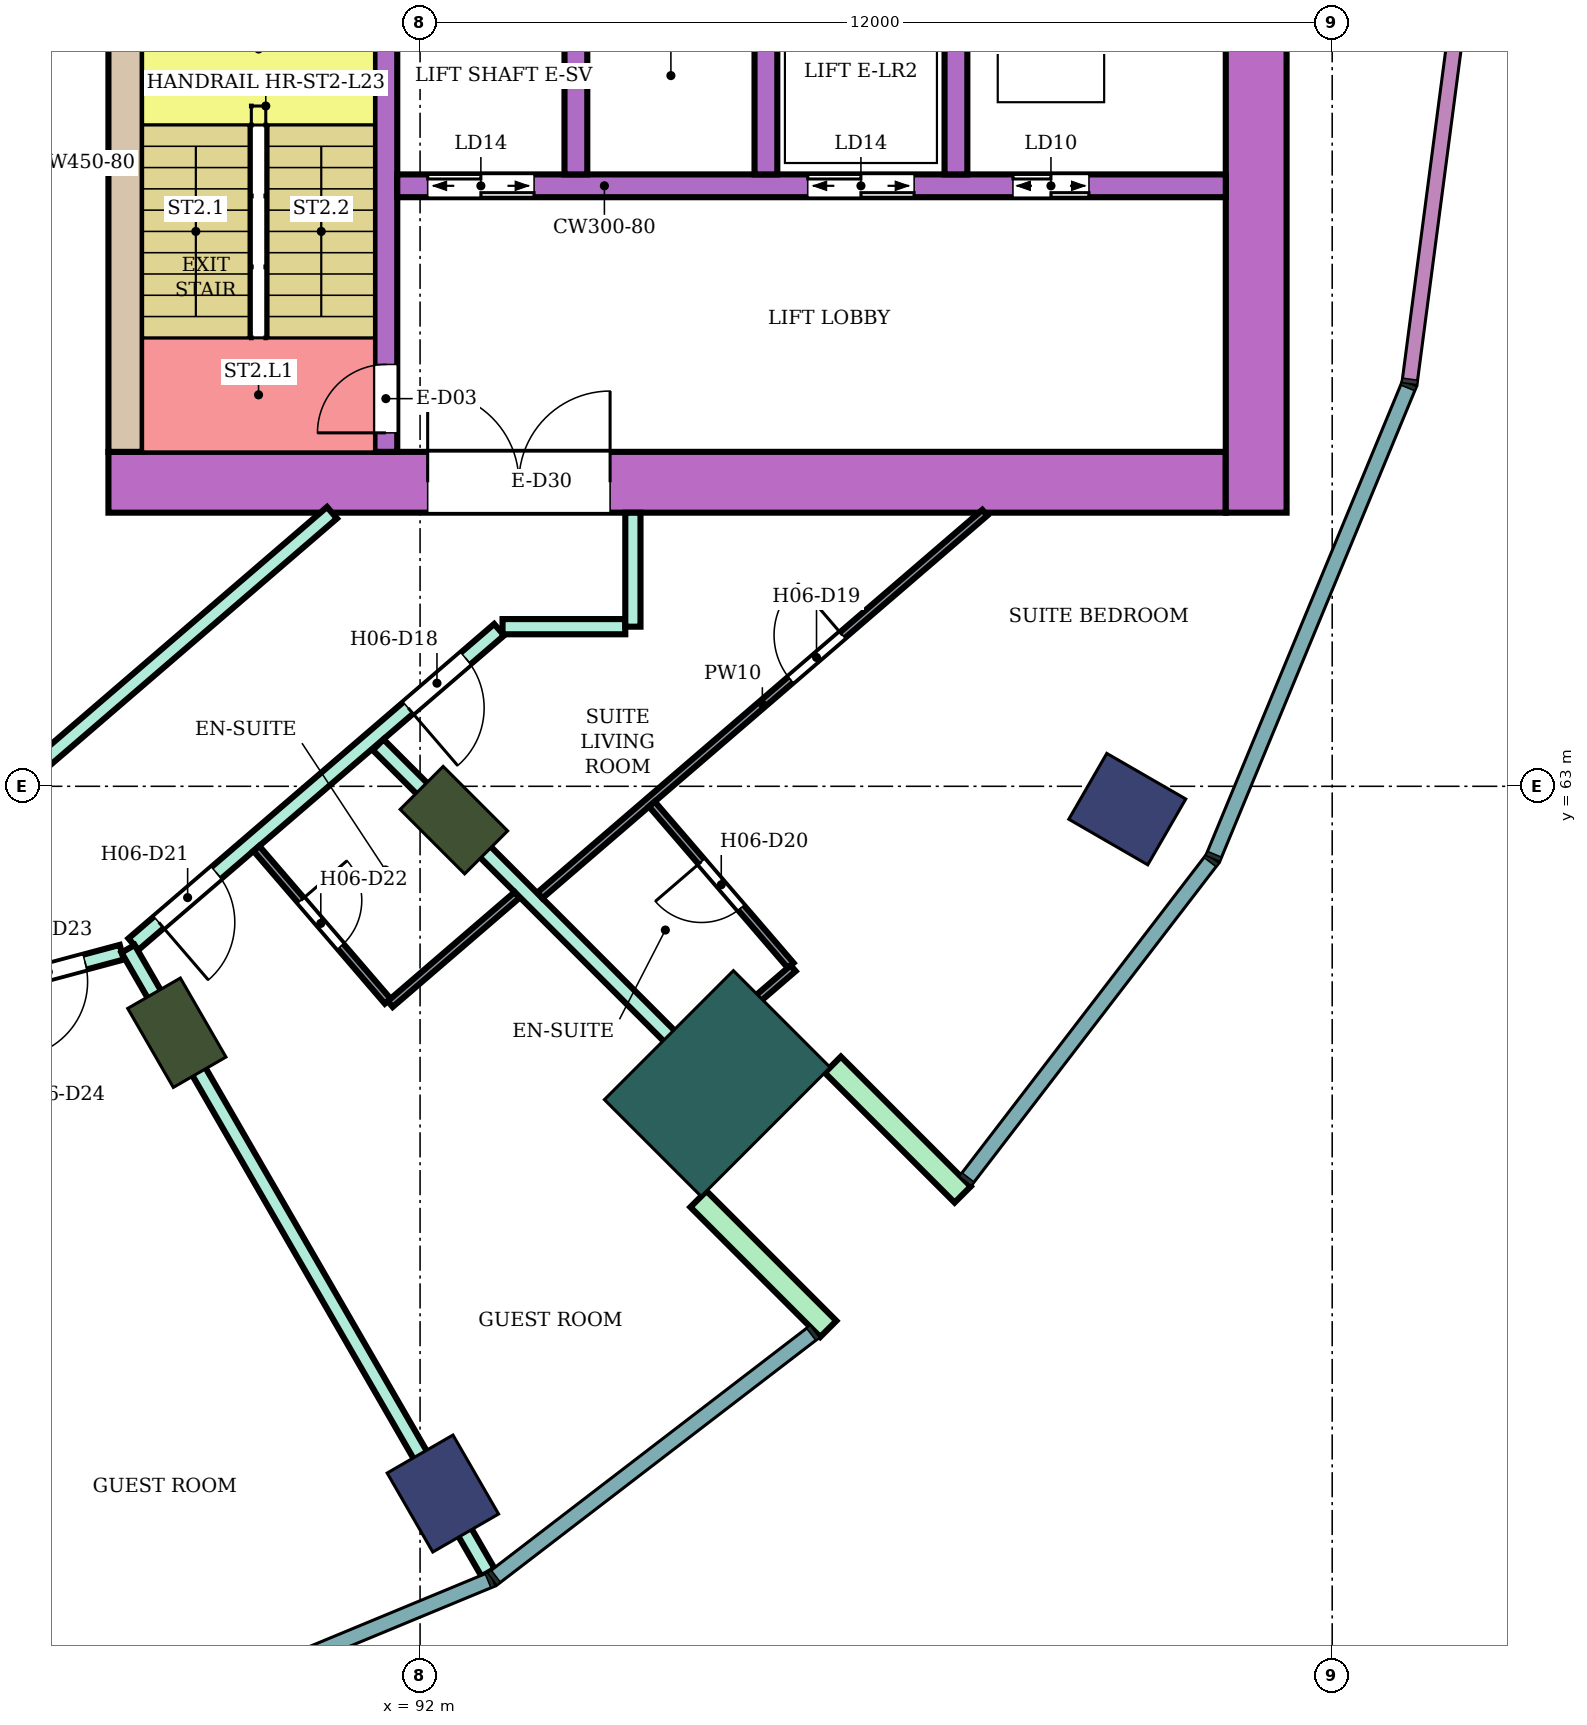
"""IFC4 building model, lengths in metres.
Left out: names, types, materials, properties, quantities, classifications, styles, units other than length and angle.
Written with IfcOpenShell. Run it as: python <this file> out.ifc"""

import sys

from ifc_helpers import new_model, si_unit, direction, frame, frame_2d, origin, origin_2d, place, context, subcontext, project, spatial, rectangle, extrude, element, fill, save


model = new_model("IFC4")
c1 = context("Model", 3, precision=1e-05, world=origin(), true_north=direction((0.0, 1.0)))
c2 = subcontext(c1, "Body", "Model", "MODEL_VIEW")
j1 = project(units=[si_unit("LENGTHUNIT", "METRE"), si_unit("PLANEANGLEUNIT", "RADIAN")], contexts=[c1])
p1 = place(None, origin())
s1 = spatial("IfcSite", under=j1, at=p1, CompositionType="ELEMENT")
p2 = place(p1, origin())
s2 = spatial("IfcBuilding", under=s1, at=p2, CompositionType="ELEMENT")
p3 = place(p2, frame((0.0, 0.0, 101.4)))
s3 = spatial("IfcBuildingStorey", under=s2, at=p3, CompositionType="ELEMENT", Elevation=101.4)
for number, where, z_axis, x_axis in (
    (1, (92.3, 53.696, 0.0), (0.0, 0.0, 1.0), (0.5, -0.866, 0.0)),
    (2, (101.304, 62.7, 0.0), (0.0, 0.0, 1.0), (0.866, -0.5, 0.0)),
):
    element("IfcColumn", number, at=place(p3, frame(where, z_axis=z_axis, x_axis=x_axis)), inside=s3, PredefinedType="COLUMN", context=c2, shape_type="SweptSolid", body=[
        extrude(rectangle(XDim=1.2, YDim=1.0, at=origin_2d()), origin(), (0.0, 0.0, 1.0), 3.8),
    ])
for number, where, z_axis, x_axis in (
    (3, (88.8, 59.758, 0.0), (0.0, 0.0, 1.0), (0.5, -0.866, 0.0)),
    (4, (92.445, 62.555, 0.0), (0.0, 0.0, 1.0), (0.707, -0.707, 0.0)),
):
    element("IfcColumn", number, at=place(p3, frame(where, z_axis=z_axis, x_axis=x_axis)), inside=s3, PredefinedType="COLUMN", context=c2, shape_type="SweptSolid", body=[
        extrude(rectangle(XDim=1.2, YDim=0.8, at=origin_2d()), origin(), (0.0, 0.0, 1.0), 3.8),
    ])
p4 = place(p3, frame((95.91, 59.09, 0.0), z_axis=(0.0, 0.0, 1.0), x_axis=(0.707106781187, -0.707106781187, 0.0)))
e5 = element("IfcColumn", 5, at=p4, inside=s3, PredefinedType="COLUMN", context=c2, shape_type="SweptSolid", body=[
    extrude(rectangle(XDim=1.8, YDim=2.4, at=origin_2d()), origin(), (0.0, 0.0, 1.0), 3.8),
])
p5 = place(p3, frame((87.9, 67.0, 0.0), z_axis=(0.0, 0.0, 1.0), x_axis=(1.0, 0.0, 0.0)))
e6 = element("IfcWall", 6, at=p5, inside=s3, PredefinedType="SHEAR", context=c2, shape_type="SweptSolid", body=[
    extrude(rectangle(XDim=14.7, YDim=0.8, at=frame_2d((7.35, 0.0))), origin(), (0.0, 0.0, 1.0), 3.48),
])
p6 = place(p5, frame((4.2, 0.0, 0.0)))
e7 = element("IfcOpeningElement", 7, at=p6, cuts=e6, PredefinedType="OPENING", context=c2, shape_type="SweptSolid", body=[
    extrude(rectangle(XDim=2.4, YDim=2.4, at=frame_2d((1.2, 1.2))), frame((0.0, 0.41, 0.0), z_axis=(0.0, -1.0, 0.0), x_axis=(1.0, 0.0, 0.0)), (0.0, 0.0, 1.0), 0.82),
])
p7 = place(p3, frame((88.125, 67.4, 0.0), z_axis=(0.0, 0.0, 1.0), x_axis=(0.0, 1.0, 0.0)))
e8 = element("IfcWall", 8, at=p7, inside=s3, PredefinedType="SHEAR", context=c2, shape_type="SweptSolid", body=[
    extrude(rectangle(XDim=7.6, YDim=0.45, at=frame_2d((3.8, 0.0))), origin(), (0.0, 0.0, 1.0), 3.48),
])
p8 = place(p3, frame((103.0, 66.6, 0.0), z_axis=(0.0, 0.0, 1.0), x_axis=(0.0, 1.0, 0.0)))
e9 = element("IfcWall", 9, at=p8, inside=s3, PredefinedType="SHEAR", context=c2, shape_type="SweptSolid", body=[
    extrude(rectangle(XDim=16.8, YDim=0.8, at=frame_2d((8.4, 0.0))), origin(), (0.0, 0.0, 1.0), 3.48),
])
p9 = place(p3, frame((91.55, 67.4, 0.0), z_axis=(0.0, 0.0, 1.0), x_axis=(0.0, 1.0, 0.0)))
e10 = element("IfcWall", 10, at=p9, inside=s3, PredefinedType="SHEAR", context=c2, shape_type="SweptSolid", body=[
    extrude(rectangle(XDim=7.6, YDim=0.3, at=frame_2d((3.8, 0.0))), origin(), (0.0, 0.0, 1.0), 3.48),
])
p10 = place(p9, frame((0.25, 0.0, 0.0)))
e11 = element("IfcOpeningElement", 11, at=p10, cuts=e10, PredefinedType="OPENING", context=c2, shape_type="SweptSolid", body=[
    extrude(rectangle(XDim=0.9, YDim=2.1, at=frame_2d((0.45, 1.05))), frame((0.0, 0.16, 0.0), z_axis=(0.0, -1.0, 0.0), x_axis=(1.0, 0.0, 0.0)), (0.0, 0.0, 1.0), 0.32),
])
p11 = place(p3, frame((91.7, 70.9, 0.0), z_axis=(0.0, 0.0, 1.0), x_axis=(1.0, 0.0, 0.0)))
e12 = element("IfcWall", 12, at=p11, inside=s3, PredefinedType="SHEAR", context=c2, shape_type="SweptSolid", body=[
    extrude(rectangle(XDim=10.9, YDim=0.3, at=frame_2d((5.45, 0.0))), origin(), (0.0, 0.0, 1.0), 3.48),
])
p12 = place(p11, frame((0.4, 0.0, 0.0)))
e13 = element("IfcOpeningElement", 13, at=p12, cuts=e12, PredefinedType="OPENING", context=c2, shape_type="SweptSolid", body=[
    extrude(rectangle(XDim=1.4, YDim=2.1, at=frame_2d((0.7, 1.05))), frame((0.0, 0.16, 0.0), z_axis=(0.0, -1.0, 0.0), x_axis=(1.0, 0.0, 0.0)), (0.0, 0.0, 1.0), 0.32),
])
p13 = place(p11, frame((5.4, 0.0, 0.0)))
e14 = element("IfcOpeningElement", 14, at=p13, cuts=e12, PredefinedType="OPENING", context=c2, shape_type="SweptSolid", body=[
    extrude(rectangle(XDim=1.4, YDim=2.1, at=frame_2d((0.7, 1.05))), frame((0.0, 0.16, 0.0), z_axis=(0.0, -1.0, 0.0), x_axis=(1.0, 0.0, 0.0)), (0.0, 0.0, 1.0), 0.32),
])
p14 = place(p11, frame((8.1, 0.0, 0.0)))
e15 = element("IfcOpeningElement", 15, at=p14, cuts=e12, PredefinedType="OPENING", context=c2, shape_type="SweptSolid", body=[
    extrude(rectangle(XDim=1.0, YDim=2.1, at=frame_2d((0.5, 1.05))), frame((0.0, 0.16, 0.0), z_axis=(0.0, -1.0, 0.0), x_axis=(1.0, 0.0, 0.0)), (0.0, 0.0, 1.0), 0.32),
])
for number, where, z_axis, x_axis in (
    (16, (94.05, 71.05, 0.0), (0.0, 0.0, 1.0), (0.0, 1.0, 0.0)),
    (17, (96.55, 71.05, 0.0), (0.0, 0.0, 1.0), (0.0, 1.0, 0.0)),
    (18, (99.05, 71.05, 0.0), (0.0, 0.0, 1.0), (0.0, 1.0, 0.0)),
):
    element("IfcWall", number, at=place(p3, frame(where, z_axis=z_axis, x_axis=x_axis)), inside=s3, PredefinedType="SHEAR", context=c2, shape_type="SweptSolid", body=[
        extrude(rectangle(XDim=2.55, YDim=0.3, at=frame_2d((1.275, 0.0))), origin(), (0.0, 0.0, 1.0), 3.48),
    ])
for number, where, z_axis, x_axis in (
    (19, (95.662, 57.57, 0.0), (0.0, 0.0, 1.0), (0.707, -0.707, 0.0)),
    (20, (97.43, 59.338, 0.0), (0.0, 0.0, 1.0), (0.707, -0.707, 0.0)),
):
    element("IfcWall", number, at=place(p3, frame(where, z_axis=z_axis, x_axis=x_axis)), inside=s3, PredefinedType="NOTDEFINED", context=c2, shape_type="SweptSolid", body=[
        extrude(rectangle(XDim=2.416, YDim=0.3, at=frame_2d((1.208, 0.0))), origin(), (0.0, 0.0, 1.0), 3.8),
    ])
p15 = place(p3, frame((86.585, 71.198, 0.0), z_axis=(0.0, 0.0, 1.0), x_axis=(0.258789828301, 0.965933654434, 0.0)))
e21 = element("IfcWall", 21, at=p15, inside=s3, PredefinedType="NOTDEFINED", context=c2, shape_type="SweptSolid", body=[
    extrude(rectangle(XDim=3.936, YDim=0.2, at=frame_2d((1.968, 0.0))), origin(), (0.0, 0.0, 1.0), 3.8),
])
p16 = place(p15, frame((0.468, 0.0, 0.9)))
e22 = element("IfcOpeningElement", 22, at=p16, cuts=e21, PredefinedType="OPENING", context=c2, shape_type="SweptSolid", body=[
    extrude(rectangle(XDim=3.0, YDim=2.3, at=frame_2d((1.5, 1.15))), frame((0.0, 0.11, 0.0), z_axis=(0.0, -1.0, 0.0), x_axis=(1.0, 0.0, 0.0)), (0.0, 0.0, 1.0), 0.22),
])
p17 = place(p3, frame((80.0, 58.655, 0.0), z_axis=(0.0, 0.0, 1.0), x_axis=(0.965967338894, 0.258664068224, 0.0)))
e23 = element("IfcWall", 23, at=p17, inside=s3, PredefinedType="PARTITIONING", context=c2, shape_type="SweptSolid", body=[
    extrude(rectangle(XDim=8.36, YDim=0.2, at=frame_2d((4.18, 0.0))), origin(), (0.0, 0.0, 1.0), 3.35),
])
p18 = place(p17, frame((6.86, 0.0, 0.0)))
e24 = element("IfcOpeningElement", 24, at=p18, cuts=e23, PredefinedType="OPENING", context=c2, shape_type="SweptSolid", body=[
    extrude(rectangle(XDim=1.0, YDim=2.1, at=frame_2d((0.5, 1.05))), frame((0.0, 0.11, 0.0), z_axis=(0.0, -1.0, 0.0), x_axis=(1.0, 0.0, 0.0)), (0.0, 0.0, 1.0), 0.22),
])
p19 = place(p3, frame((86.877, 63.189, 0.0), z_axis=(0.0, 0.0, 1.0), x_axis=(0.758088707506, 0.652151448325, 0.0)))
e25 = element("IfcWall", 25, at=p19, inside=s3, PredefinedType="PARTITIONING", context=c2, shape_type="SweptSolid", body=[
    extrude(rectangle(XDim=5.229, YDim=0.2, at=frame_2d((2.615, 0.0))), origin(), (0.0, 0.0, 1.0), 3.35),
])
p20 = place(p3, frame((88.229, 60.923, 0.0), z_axis=(0.0, 0.0, 1.0), x_axis=(0.758220952094, 0.651997690031, 0.0)))
e26 = element("IfcWall", 26, at=p20, inside=s3, PredefinedType="PARTITIONING", context=c2, shape_type="SweptSolid", body=[
    extrude(rectangle(XDim=6.346, YDim=0.2, at=frame_2d((3.173, 0.0))), origin(), (0.0, 0.0, 1.0), 3.35),
])
p21 = place(p20, frame((4.767, 0.0, 0.0)))
e27 = element("IfcOpeningElement", 27, at=p21, cuts=e26, PredefinedType="OPENING", context=c2, shape_type="SweptSolid", body=[
    extrude(rectangle(XDim=1.0, YDim=2.1, at=frame_2d((0.5, 1.05))), frame((0.0, 0.11, 0.0), z_axis=(0.0, -1.0, 0.0), x_axis=(1.0, 0.0, 0.0)), (0.0, 0.0, 1.0), 0.22),
])
p22 = place(p20, frame((0.44, 0.0, 0.0)))
e28 = element("IfcOpeningElement", 28, at=p22, cuts=e26, PredefinedType="OPENING", context=c2, shape_type="SweptSolid", body=[
    extrude(rectangle(XDim=1.0, YDim=2.1, at=frame_2d((0.5, 1.05))), frame((0.0, 0.11, 0.0), z_axis=(0.0, -1.0, 0.0), x_axis=(1.0, 0.0, 0.0)), (0.0, 0.0, 1.0), 0.22),
])
p23 = place(p3, frame((88.158, 60.862, 0.0), z_axis=(0.0, 0.0, 1.0), x_axis=(0.499916512745, -0.866073599808, 0.0)))
e29 = element("IfcWall", 29, at=p23, inside=s3, PredefinedType="PARTITIONING", context=c2, shape_type="SweptSolid", body=[
    extrude(rectangle(XDim=9.475, YDim=0.2, at=frame_2d((4.737, 0.0))), origin(), (0.0, 0.0, 1.0), 3.35),
])
p24 = place(p3, frame((91.448, 63.547, 0.0), z_axis=(0.0, 0.0, 1.0), x_axis=(0.706949958062, -0.707263569538, 0.0)))
e30 = element("IfcWall", 30, at=p24, inside=s3, PredefinedType="PARTITIONING", context=c2, shape_type="SweptSolid", body=[
    extrude(rectangle(XDim=7.006, YDim=0.2, at=frame_2d((3.503, 0.0))), origin(), (0.0, 0.0, 1.0), 3.35),
])
p25 = place(p3, frame((93.085, 65.1, 0.0), z_axis=(0.0, 0.0, 1.0), x_axis=(1.0, 0.0, 0.0)))
e31 = element("IfcWall", 31, at=p25, inside=s3, PredefinedType="PARTITIONING", context=c2, shape_type="SweptSolid", body=[
    extrude(rectangle(XDim=1.615, YDim=0.2, at=frame_2d((0.808, 0.0))), origin(), (0.0, 0.0, 1.0), 3.35),
])
p26 = place(p3, frame((94.8, 65.1, 0.0), z_axis=(0.0, 0.0, 1.0), x_axis=(0.0, 1.0, 0.0)))
e32 = element("IfcWall", 32, at=p26, inside=s3, PredefinedType="PARTITIONING", context=c2, shape_type="SweptSolid", body=[
    extrude(rectangle(XDim=1.499, YDim=0.2, at=frame_2d((0.75, 0.0))), origin(), (0.0, 0.0, 1.0), 3.35),
])
p27 = place(p3, frame((89.846, 62.182, 0.0), z_axis=(0.0, 0.0, 1.0), x_axis=(0.652095405055, -0.758136915541, 0.0)))
e33 = element("IfcWall", 33, at=p27, inside=s3, PredefinedType="PARTITIONING", context=c2, shape_type="SweptSolid", body=[
    extrude(rectangle(XDim=2.65, YDim=0.1, at=frame_2d((1.325, 0.0))), origin(), (0.0, 0.0, 1.0), 3.35),
])
p28 = place(p27, frame((0.9, 0.0, 0.0)))
e34 = element("IfcOpeningElement", 34, at=p28, cuts=e33, PredefinedType="OPENING", context=c2, shape_type="SweptSolid", body=[
    extrude(rectangle(XDim=0.8, YDim=2.1, at=frame_2d((0.4, 1.05))), frame((0.0, 0.06, 0.0), z_axis=(0.0, -1.0, 0.0), x_axis=(1.0, 0.0, 0.0)), (0.0, 0.0, 1.0), 0.12),
])
p29 = place(p3, frame((91.607, 60.135, 0.0), z_axis=(0.0, 0.0, 1.0), x_axis=(0.758135842672, 0.652096652388, 0.0)))
e35 = element("IfcWall", 35, at=p29, inside=s3, PredefinedType="PARTITIONING", context=c2, shape_type="SweptSolid", body=[
    extrude(rectangle(XDim=2.201, YDim=0.1, at=frame_2d((1.101, 0.0))), origin(), (0.0, 0.0, 1.0), 3.35),
])
p30 = place(p3, frame((93.577, 61.565, 0.0), z_axis=(0.0, 0.0, 1.0), x_axis=(0.75812140399, 0.652113438607, 0.0)))
e36 = element("IfcWall", 36, at=p30, inside=s3, PredefinedType="PARTITIONING", context=c2, shape_type="SweptSolid", body=[
    extrude(rectangle(XDim=7.72, YDim=0.1, at=frame_2d((3.86, 0.0))), origin(), (0.0, 0.0, 1.0), 3.35),
])
p31 = place(p30, frame((4.35, 0.0, 0.0)))
e37 = element("IfcOpeningElement", 37, at=p31, cuts=e36, PredefinedType="OPENING", context=c2, shape_type="SweptSolid", body=[
    extrude(rectangle(XDim=0.9, YDim=2.1, at=frame_2d((0.45, 1.05))), frame((0.0, 0.06, 0.0), z_axis=(0.0, -1.0, 0.0), x_axis=(1.0, 0.0, 0.0)), (0.0, 0.0, 1.0), 0.12),
])
p32 = place(p3, frame((95.05, 62.766, 0.0), z_axis=(0.0, 0.0, 1.0), x_axis=(0.652190642827, -0.75805498838, 0.0)))
e38 = element("IfcWall", 38, at=p32, inside=s3, PredefinedType="PARTITIONING", context=c2, shape_type="SweptSolid", body=[
    extrude(rectangle(XDim=2.8, YDim=0.1, at=frame_2d((1.4, 0.0))), origin(), (0.0, 0.0, 1.0), 3.35),
])
p33 = place(p32, frame((1.0, 0.0, 0.0)))
e39 = element("IfcOpeningElement", 39, at=p33, cuts=e38, PredefinedType="OPENING", context=c2, shape_type="SweptSolid", body=[
    extrude(rectangle(XDim=0.8, YDim=2.1, at=frame_2d((0.4, 1.05))), frame((0.0, 0.06, 0.0), z_axis=(0.0, -1.0, 0.0), x_axis=(1.0, 0.0, 0.0)), (0.0, 0.0, 1.0), 0.12),
])
p34 = place(p3, frame((95.634, 59.509, 0.0), z_axis=(0.0, 0.0, 1.0), x_axis=(0.757922369717, 0.652344756614, 0.0)))
e40 = element("IfcWall", 40, at=p34, inside=s3, PredefinedType="PARTITIONING", context=c2, shape_type="SweptSolid", body=[
    extrude(rectangle(XDim=1.681, YDim=0.1, at=frame_2d((0.841, 0.0))), origin(), (0.0, 0.0, 1.0), 3.35),
])
p35 = place(p16, origin())
e41 = element("IfcWindow", 41, at=p35, inside=s3, PartitioningType="SINGLE_PANEL", PredefinedType="WINDOW", context=c2, shape_type="SweptSolid", body=[
    extrude(rectangle(XDim=3.0, YDim=2.3, at=frame_2d((1.5, 1.15))), frame((0.0, 0.03, 0.0), z_axis=(0.0, -1.0, 0.0), x_axis=(1.0, 0.0, 0.0)), (0.0, 0.0, 1.0), 0.06),
])
fill(e22, e41)
p36 = place(p21, frame((1.0, 0.0, 0.0), z_axis=(0.0, 0.0, 1.0), x_axis=(-1.0, 0.0, 0.0)))
e42 = element("IfcDoor", 42, at=p36, inside=s3, OperationType="SINGLE_SWING_RIGHT", PredefinedType="DOOR", context=c2, shape_type="SweptSolid", body=[
    extrude(rectangle(XDim=1.0, YDim=2.1, at=frame_2d((0.5, 1.05))), frame((0.0, 0.025, 0.0), z_axis=(0.0, -1.0, 0.0), x_axis=(1.0, 0.0, 0.0)), (0.0, 0.0, 1.0), 0.05),
])
fill(e27, e42)
p37 = place(p31, origin())
e43 = element("IfcDoor", 43, at=p37, inside=s3, OperationType="SINGLE_SWING_RIGHT", PredefinedType="DOOR", context=c2, shape_type="SweptSolid", body=[
    extrude(rectangle(XDim=0.9, YDim=2.1, at=frame_2d((0.45, 1.05))), frame((0.0, 0.025, 0.0), z_axis=(0.0, -1.0, 0.0), x_axis=(1.0, 0.0, 0.0)), (0.0, 0.0, 1.0), 0.05),
])
fill(e37, e43)
p38 = place(p33, frame((0.8, 0.0, 0.0), z_axis=(0.0, 0.0, 1.0), x_axis=(-1.0, 0.0, 0.0)))
e44 = element("IfcDoor", 44, at=p38, inside=s3, OperationType="SINGLE_SWING_RIGHT", PredefinedType="DOOR", context=c2, shape_type="SweptSolid", body=[
    extrude(rectangle(XDim=0.8, YDim=2.1, at=frame_2d((0.4, 1.05))), frame((0.0, 0.025, 0.0), z_axis=(0.0, -1.0, 0.0), x_axis=(1.0, 0.0, 0.0)), (0.0, 0.0, 1.0), 0.05),
])
fill(e39, e44)
p39 = place(p22, frame((1.0, 0.0, 0.0), z_axis=(0.0, 0.0, 1.0), x_axis=(-1.0, 0.0, 0.0)))
e45 = element("IfcDoor", 45, at=p39, inside=s3, OperationType="SINGLE_SWING_RIGHT", PredefinedType="DOOR", context=c2, shape_type="SweptSolid", body=[
    extrude(rectangle(XDim=1.0, YDim=2.1, at=frame_2d((0.5, 1.05))), frame((0.0, 0.025, 0.0), z_axis=(0.0, -1.0, 0.0), x_axis=(1.0, 0.0, 0.0)), (0.0, 0.0, 1.0), 0.05),
])
fill(e28, e45)
p40 = place(p28, origin())
e46 = element("IfcDoor", 46, at=p40, inside=s3, OperationType="SINGLE_SWING_LEFT", PredefinedType="DOOR", context=c2, shape_type="SweptSolid", body=[
    extrude(rectangle(XDim=0.8, YDim=2.1, at=frame_2d((0.4, 1.05))), frame((0.0, 0.025, 0.0), z_axis=(0.0, -1.0, 0.0), x_axis=(1.0, 0.0, 0.0)), (0.0, 0.0, 1.0), 0.05),
])
fill(e34, e46)
p41 = place(p18, frame((1.0, 0.0, 0.0), z_axis=(0.0, 0.0, 1.0), x_axis=(-1.0, 0.0, 0.0)))
e47 = element("IfcDoor", 47, at=p41, inside=s3, OperationType="SINGLE_SWING_RIGHT", PredefinedType="DOOR", context=c2, shape_type="SweptSolid", body=[
    extrude(rectangle(XDim=1.0, YDim=2.1, at=frame_2d((0.5, 1.05))), frame((0.0, 0.025, 0.0), z_axis=(0.0, -1.0, 0.0), x_axis=(1.0, 0.0, 0.0)), (0.0, 0.0, 1.0), 0.05),
])
fill(e24, e47)
p42 = place(p10, origin())
e48 = element("IfcDoor", 48, at=p42, inside=s3, OperationType="SINGLE_SWING_LEFT", PredefinedType="DOOR", context=c2, shape_type="SweptSolid", body=[
    extrude(rectangle(XDim=0.9, YDim=2.1, at=frame_2d((0.45, 1.05))), frame((0.0, 0.025, 0.0), z_axis=(0.0, -1.0, 0.0), x_axis=(1.0, 0.0, 0.0)), (0.0, 0.0, 1.0), 0.05),
])
fill(e11, e48)
p43 = place(p12, origin())
e49 = element("IfcDoor", 49, at=p43, inside=s3, OperationType="DOUBLE_DOOR_SLIDING", PredefinedType="DOOR", context=c2, shape_type="SweptSolid", body=[
    extrude(rectangle(XDim=1.4, YDim=2.1, at=frame_2d((0.7, 1.05))), frame((0.0, 0.025, 0.0), z_axis=(0.0, -1.0, 0.0), x_axis=(1.0, 0.0, 0.0)), (0.0, 0.0, 1.0), 0.05),
])
fill(e13, e49)
p44 = place(p13, origin())
e50 = element("IfcDoor", 50, at=p44, inside=s3, OperationType="DOUBLE_DOOR_SLIDING", PredefinedType="DOOR", context=c2, shape_type="SweptSolid", body=[
    extrude(rectangle(XDim=1.4, YDim=2.1, at=frame_2d((0.7, 1.05))), frame((0.0, 0.025, 0.0), z_axis=(0.0, -1.0, 0.0), x_axis=(1.0, 0.0, 0.0)), (0.0, 0.0, 1.0), 0.05),
])
fill(e14, e50)
p45 = place(p14, origin())
e51 = element("IfcDoor", 51, at=p45, inside=s3, OperationType="DOUBLE_DOOR_SLIDING", PredefinedType="DOOR", context=c2, shape_type="SweptSolid", body=[
    extrude(rectangle(XDim=1.0, YDim=2.1, at=frame_2d((0.5, 1.05))), frame((0.0, 0.025, 0.0), z_axis=(0.0, -1.0, 0.0), x_axis=(1.0, 0.0, 0.0)), (0.0, 0.0, 1.0), 0.05),
])
fill(e15, e51)
p46 = place(p6, origin())
e52 = element("IfcDoor", 52, at=p46, inside=s3, OperationType="DOUBLE_DOOR_SINGLE_SWING", PredefinedType="DOOR", context=c2, shape_type="SweptSolid", body=[
    extrude(rectangle(XDim=2.4, YDim=2.4, at=frame_2d((1.2, 1.2))), frame((0.0, 0.025, 0.0), z_axis=(0.0, -1.0, 0.0), x_axis=(1.0, 0.0, 0.0)), (0.0, 0.0, 1.0), 0.05),
])
fill(e7, e52)
save(model, sys.argv[1])
